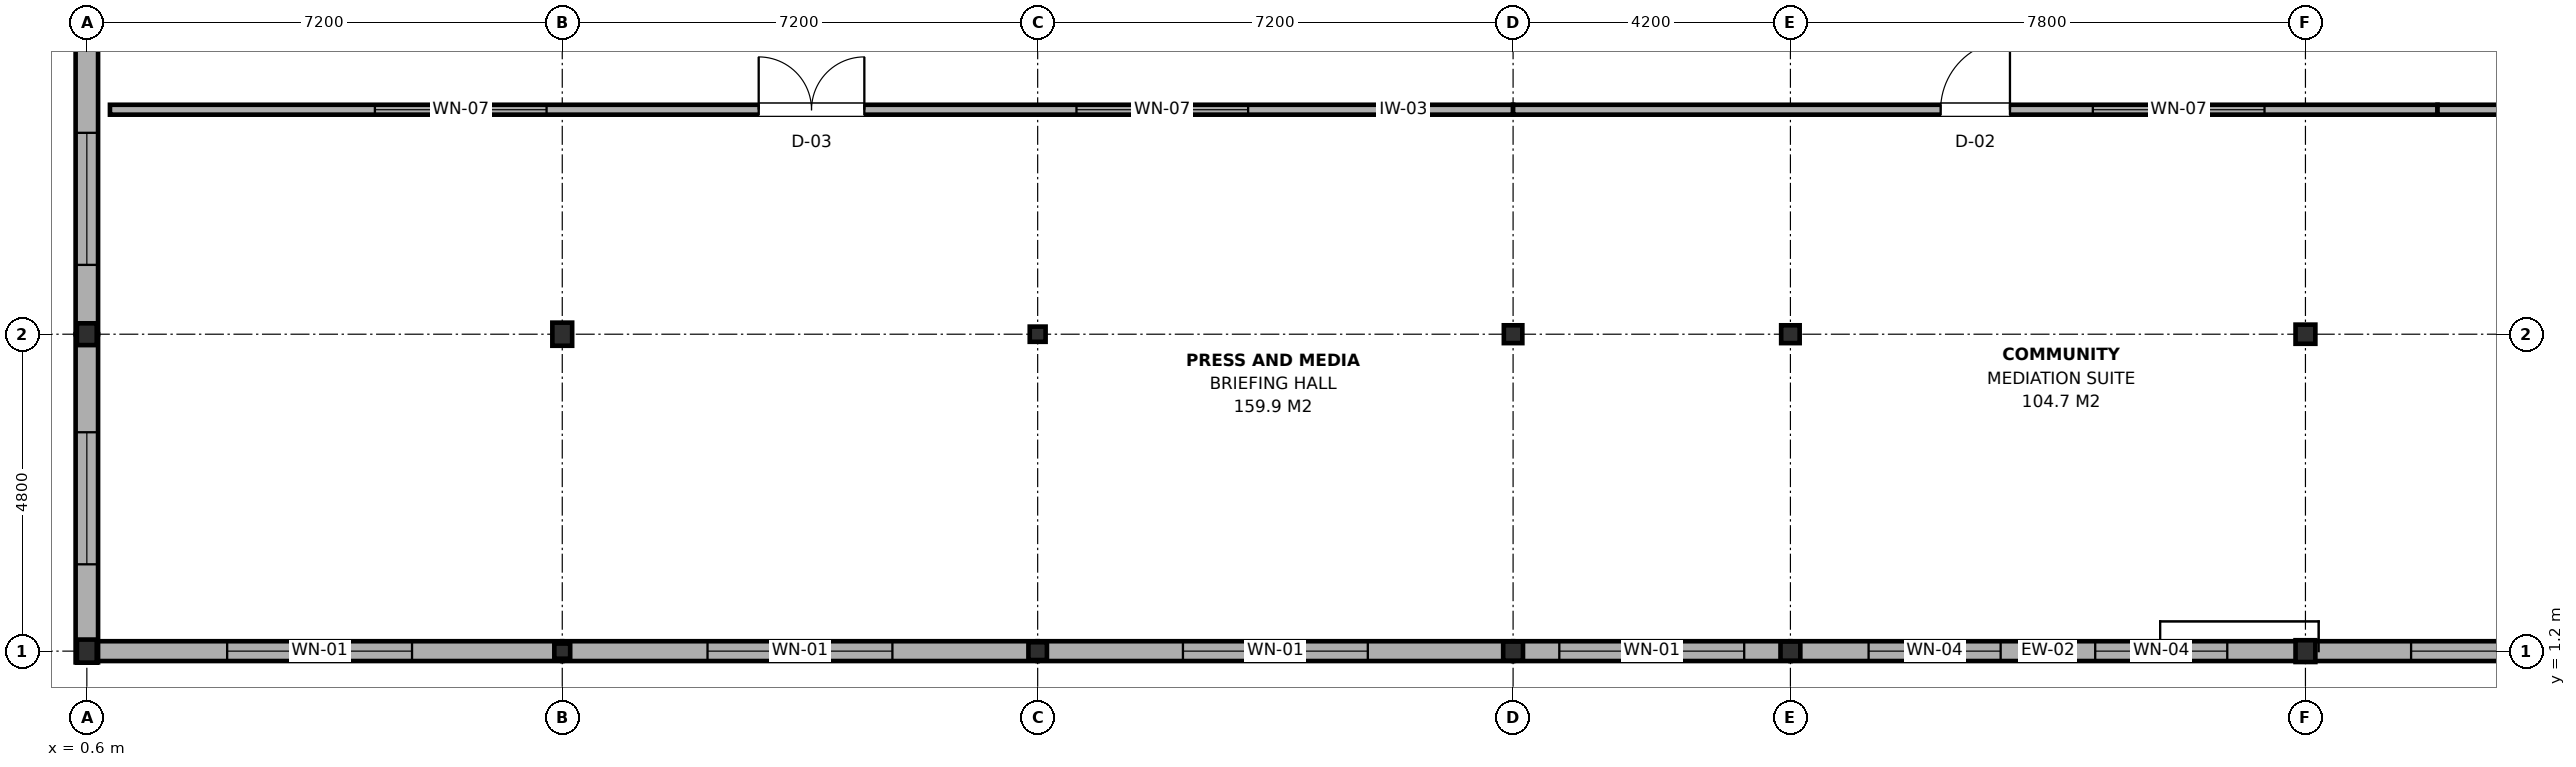
"""IFC4 building model, lengths in metres.
Left out: names, types, materials, properties, quantities, classifications, styles, units other than length and angle.
Written with IfcOpenShell. Run it as: python <this file> out.ifc"""

import sys

from ifc_helpers import new_model, si_unit, direction, frame, frame_2d, origin, origin_2d, place, context, subcontext, project, spatial, rectangle, i_section, extrude, element, fill, save


model = new_model("IFC4")
c1 = context("Model", 3, precision=1e-05, world=origin(), true_north=direction((0.0, 1.0)))
c2 = subcontext(c1, "Body", "Model", "MODEL_VIEW")
j1 = project(units=[si_unit("LENGTHUNIT", "METRE"), si_unit("PLANEANGLEUNIT", "RADIAN")], contexts=[c1])
p1 = place(None, origin())
s1 = spatial("IfcSite", under=j1, at=p1, CompositionType="ELEMENT")
p2 = place(p1, origin())
s2 = spatial("IfcBuilding", under=s1, at=p2, CompositionType="ELEMENT")
p3 = place(p2, frame((0.0, 0.0, 4.8)))
s3 = spatial("IfcBuildingStorey", under=s2, at=p3, CompositionType="ELEMENT", Elevation=4.8)
p4 = place(p3, frame((0.6, 1.2, 0.0), z_axis=(0.0, 0.0, 1.0), x_axis=(1.0, 0.0, 0.0)))
e1 = element("IfcColumn", 1, at=p4, inside=s3, PredefinedType="COLUMN", context=c2, shape_type="SweptSolid", body=[
    extrude(i_section(OverallWidth=0.3, OverallDepth=0.35, WebThickness=0.01, FlangeThickness=0.018, FilletRadius=0.027, at=origin_2d()), origin(), (0.0, 0.0, 1.0), 3.98),
])
p5 = place(p3, frame((0.6, 6.0, 0.0), z_axis=(0.0, 0.0, 1.0), x_axis=(1.0, 0.0, 0.0)))
e2 = element("IfcColumn", 2, at=p5, inside=s3, PredefinedType="COLUMN", context=c2, shape_type="SweptSolid", body=[
    extrude(i_section(OverallWidth=0.3, OverallDepth=0.33, WebThickness=0.01, FlangeThickness=0.017, FilletRadius=0.027, at=origin_2d()), origin(), (0.0, 0.0, 1.0), 3.98),
])
p6 = place(p3, frame((7.8, 1.2, 0.0), z_axis=(0.0, 0.0, 1.0), x_axis=(1.0, 0.0, 0.0)))
e3 = element("IfcColumn", 3, at=p6, inside=s3, PredefinedType="COLUMN", context=c2, shape_type="SweptSolid", body=[
    extrude(i_section(OverallWidth=0.24, OverallDepth=0.23, WebThickness=0.008, FlangeThickness=0.012, FilletRadius=0.021, at=origin_2d()), origin(), (0.0, 0.0, 1.0), 3.98),
])
p7 = place(p3, frame((7.8, 6.0, 0.0), z_axis=(0.0, 0.0, 1.0), x_axis=(1.0, 0.0, 0.0)))
e4 = element("IfcColumn", 4, at=p7, inside=s3, PredefinedType="COLUMN", context=c2, shape_type="SweptSolid", body=[
    extrude(i_section(OverallWidth=0.3, OverallDepth=0.35, WebThickness=0.01, FlangeThickness=0.018, FilletRadius=0.027, at=origin_2d()), origin(), (0.0, 0.0, 1.0), 3.98),
])
p8 = place(p3, frame((15.0, 1.2, 0.0), z_axis=(0.0, 0.0, 1.0), x_axis=(1.0, 0.0, 0.0)))
e5 = element("IfcColumn", 5, at=p8, inside=s3, PredefinedType="COLUMN", context=c2, shape_type="SweptSolid", body=[
    extrude(i_section(OverallWidth=0.28, OverallDepth=0.27, WebThickness=0.008, FlangeThickness=0.013, FilletRadius=0.024, at=origin_2d()), origin(), (0.0, 0.0, 1.0), 3.98),
])
p9 = place(p3, frame((15.0, 6.0, 0.0), z_axis=(0.0, 0.0, 1.0), x_axis=(1.0, 0.0, 0.0)))
e6 = element("IfcColumn", 6, at=p9, inside=s3, PredefinedType="COLUMN", context=c2, shape_type="SweptSolid", body=[
    extrude(i_section(OverallWidth=0.24, OverallDepth=0.23, WebThickness=0.008, FlangeThickness=0.012, FilletRadius=0.021, at=origin_2d()), origin(), (0.0, 0.0, 1.0), 3.98),
])
p10 = place(p3, frame((22.2, 1.2, 0.0), z_axis=(0.0, 0.0, 1.0), x_axis=(1.0, 0.0, 0.0)))
e7 = element("IfcColumn", 7, at=p10, inside=s3, PredefinedType="COLUMN", context=c2, shape_type="SweptSolid", body=[
    extrude(i_section(OverallWidth=0.3, OverallDepth=0.29, WebThickness=0.009, FlangeThickness=0.014, FilletRadius=0.027, at=origin_2d()), origin(), (0.0, 0.0, 1.0), 3.98),
])
p11 = place(p3, frame((22.2, 6.0, 0.0), z_axis=(0.0, 0.0, 1.0), x_axis=(1.0, 0.0, 0.0)))
e8 = element("IfcColumn", 8, at=p11, inside=s3, PredefinedType="COLUMN", context=c2, shape_type="SweptSolid", body=[
    extrude(i_section(OverallWidth=0.28, OverallDepth=0.27, WebThickness=0.008, FlangeThickness=0.013, FilletRadius=0.024, at=origin_2d()), origin(), (0.0, 0.0, 1.0), 3.98),
])
p12 = place(p3, frame((26.4, 1.2, 0.0), z_axis=(0.0, 0.0, 1.0), x_axis=(1.0, 0.0, 0.0)))
e9 = element("IfcColumn", 9, at=p12, inside=s3, PredefinedType="COLUMN", context=c2, shape_type="SweptSolid", body=[
    extrude(i_section(OverallWidth=0.3, OverallDepth=0.29, WebThickness=0.009, FlangeThickness=0.014, FilletRadius=0.027, at=origin_2d()), origin(), (0.0, 0.0, 1.0), 3.98),
])
p13 = place(p3, frame((26.4, 6.0, 0.0), z_axis=(0.0, 0.0, 1.0), x_axis=(1.0, 0.0, 0.0)))
e10 = element("IfcColumn", 10, at=p13, inside=s3, PredefinedType="COLUMN", context=c2, shape_type="SweptSolid", body=[
    extrude(i_section(OverallWidth=0.28, OverallDepth=0.27, WebThickness=0.008, FlangeThickness=0.013, FilletRadius=0.024, at=origin_2d()), origin(), (0.0, 0.0, 1.0), 3.98),
])
p14 = place(p3, frame((34.2, 1.2, 0.0), z_axis=(0.0, 0.0, 1.0), x_axis=(1.0, 0.0, 0.0)))
e11 = element("IfcColumn", 11, at=p14, inside=s3, PredefinedType="COLUMN", context=c2, shape_type="SweptSolid", body=[
    extrude(i_section(OverallWidth=0.3, OverallDepth=0.33, WebThickness=0.01, FlangeThickness=0.017, FilletRadius=0.027, at=origin_2d()), origin(), (0.0, 0.0, 1.0), 3.98),
])
p15 = place(p3, frame((34.2, 6.0, 0.0), z_axis=(0.0, 0.0, 1.0), x_axis=(1.0, 0.0, 0.0)))
e12 = element("IfcColumn", 12, at=p15, inside=s3, PredefinedType="COLUMN", context=c2, shape_type="SweptSolid", body=[
    extrude(i_section(OverallWidth=0.3, OverallDepth=0.29, WebThickness=0.009, FlangeThickness=0.014, FilletRadius=0.027, at=origin_2d()), origin(), (0.0, 0.0, 1.0), 3.98),
])
p16 = place(p3, frame((0.45, 1.2, 0.0), z_axis=(0.0, 0.0, 1.0), x_axis=(1.0, 0.0, 0.0)))
e13 = element("IfcWall", 13, at=p16, inside=s3, PredefinedType="SOLIDWALL", context=c2, shape_type="SweptSolid", body=[
    extrude(rectangle(XDim=7.35, YDim=0.3, at=frame_2d((3.675, 0.0))), origin(), (0.0, 0.0, 1.0), 3.475),
])
p17 = place(p16, frame((2.275, 0.0, 0.9)))
e14 = element("IfcOpeningElement", 14, at=p17, cuts=e13, PredefinedType="OPENING", context=c2, shape_type="SweptSolid", body=[
    extrude(rectangle(XDim=2.8, YDim=2.2, at=frame_2d((1.4, 1.1))), frame((0.0, 0.165, 0.0), z_axis=(0.0, -1.0, 0.0), x_axis=(1.0, 0.0, 0.0)), (0.0, 0.0, 1.0), 0.33),
])
p18 = place(p3, frame((7.8, 1.2, 0.0), z_axis=(0.0, 0.0, 1.0), x_axis=(1.0, 0.0, 0.0)))
e15 = element("IfcWall", 15, at=p18, inside=s3, PredefinedType="SOLIDWALL", context=c2, shape_type="SweptSolid", body=[
    extrude(rectangle(XDim=7.2, YDim=0.3, at=frame_2d((3.6, 0.0))), origin(), (0.0, 0.0, 1.0), 3.475),
])
p19 = place(p18, frame((2.2, 0.0, 0.9)))
e16 = element("IfcOpeningElement", 16, at=p19, cuts=e15, PredefinedType="OPENING", context=c2, shape_type="SweptSolid", body=[
    extrude(rectangle(XDim=2.8, YDim=2.2, at=frame_2d((1.4, 1.1))), frame((0.0, 0.165, 0.0), z_axis=(0.0, -1.0, 0.0), x_axis=(1.0, 0.0, 0.0)), (0.0, 0.0, 1.0), 0.33),
])
p20 = place(p3, frame((15.0, 1.2, 0.0), z_axis=(0.0, 0.0, 1.0), x_axis=(1.0, 0.0, 0.0)))
e17 = element("IfcWall", 17, at=p20, inside=s3, PredefinedType="SOLIDWALL", context=c2, shape_type="SweptSolid", body=[
    extrude(rectangle(XDim=7.2, YDim=0.3, at=frame_2d((3.6, 0.0))), origin(), (0.0, 0.0, 1.0), 3.525),
])
p21 = place(p20, frame((2.2, 0.0, 0.9)))
e18 = element("IfcOpeningElement", 18, at=p21, cuts=e17, PredefinedType="OPENING", context=c2, shape_type="SweptSolid", body=[
    extrude(rectangle(XDim=2.8, YDim=2.2, at=frame_2d((1.4, 1.1))), frame((0.0, 0.165, 0.0), z_axis=(0.0, -1.0, 0.0), x_axis=(1.0, 0.0, 0.0)), (0.0, 0.0, 1.0), 0.33),
])
p22 = place(p3, frame((22.2, 1.2, 0.0), z_axis=(0.0, 0.0, 1.0), x_axis=(1.0, 0.0, 0.0)))
e19 = element("IfcWall", 19, at=p22, inside=s3, PredefinedType="SOLIDWALL", context=c2, shape_type="SweptSolid", body=[
    extrude(rectangle(XDim=4.2, YDim=0.3, at=frame_2d((2.1, 0.0))), origin(), (0.0, 0.0, 1.0), 3.375),
])
p23 = place(p22, frame((0.7, 0.0, 0.9)))
e20 = element("IfcOpeningElement", 20, at=p23, cuts=e19, PredefinedType="OPENING", context=c2, shape_type="SweptSolid", body=[
    extrude(rectangle(XDim=2.8, YDim=2.2, at=frame_2d((1.4, 1.1))), frame((0.0, 0.165, 0.0), z_axis=(0.0, -1.0, 0.0), x_axis=(1.0, 0.0, 0.0)), (0.0, 0.0, 1.0), 0.33),
])
p24 = place(p3, frame((26.4, 1.2, 0.0), z_axis=(0.0, 0.0, 1.0), x_axis=(1.0, 0.0, 0.0)))
e21 = element("IfcWall", 21, at=p24, inside=s3, PredefinedType="SOLIDWALL", context=c2, shape_type="SweptSolid", body=[
    extrude(rectangle(XDim=7.8, YDim=0.3, at=frame_2d((3.9, 0.0))), origin(), (0.0, 0.0, 1.0), 3.375),
])
p25 = place(p24, frame((1.184, 0.0, 0.9)))
e22 = element("IfcOpeningElement", 22, at=p25, cuts=e21, PredefinedType="OPENING", context=c2, shape_type="SweptSolid", body=[
    extrude(rectangle(XDim=2.0, YDim=1.8, at=frame_2d((1.0, 0.9))), frame((0.0, 0.165, 0.0), z_axis=(0.0, -1.0, 0.0), x_axis=(1.0, 0.0, 0.0)), (0.0, 0.0, 1.0), 0.33),
])
p26 = place(p24, frame((4.616, 0.0, 0.9)))
e23 = element("IfcOpeningElement", 23, at=p26, cuts=e21, PredefinedType="OPENING", context=c2, shape_type="SweptSolid", body=[
    extrude(rectangle(XDim=2.0, YDim=1.8, at=frame_2d((1.0, 0.9))), frame((0.0, 0.165, 0.0), z_axis=(0.0, -1.0, 0.0), x_axis=(1.0, 0.0, 0.0)), (0.0, 0.0, 1.0), 0.33),
])
p27 = place(p3, frame((34.2, 1.2, 0.0), z_axis=(0.0, 0.0, 1.0), x_axis=(1.0, 0.0, 0.0)))
e24 = element("IfcWall", 24, at=p27, inside=s3, PredefinedType="SOLIDWALL", context=c2, shape_type="SweptSolid", body=[
    extrude(rectangle(XDim=6.0, YDim=0.3, at=frame_2d((3.0, 0.0))), origin(), (0.0, 0.0, 1.0), 3.375),
])
p28 = place(p27, frame((1.6, 0.0, 0.9)))
e25 = element("IfcOpeningElement", 25, at=p28, cuts=e24, PredefinedType="OPENING", context=c2, shape_type="SweptSolid", body=[
    extrude(rectangle(XDim=2.8, YDim=2.2, at=frame_2d((1.4, 1.1))), frame((0.0, 0.165, 0.0), z_axis=(0.0, -1.0, 0.0), x_axis=(1.0, 0.0, 0.0)), (0.0, 0.0, 1.0), 0.33),
])
p29 = place(p3, frame((0.6, 1.03, 0.0), z_axis=(0.0, 0.0, 1.0), x_axis=(0.0, 1.0, 0.0)))
e26 = element("IfcWall", 26, at=p29, inside=s3, PredefinedType="SOLIDWALL", context=c2, shape_type="SweptSolid", body=[
    extrude(rectangle(XDim=4.97, YDim=0.34, at=frame_2d((2.485, 0.0))), origin(), (0.0, 0.0, 1.0), 3.475),
])
p30 = place(p29, frame((1.485, 0.0, 0.9)))
e27 = element("IfcOpeningElement", 27, at=p30, cuts=e26, PredefinedType="OPENING", context=c2, shape_type="SweptSolid", body=[
    extrude(rectangle(XDim=2.0, YDim=1.8, at=frame_2d((1.0, 0.9))), frame((0.0, 0.185, 0.0), z_axis=(0.0, -1.0, 0.0), x_axis=(1.0, 0.0, 0.0)), (0.0, 0.0, 1.0), 0.37),
])
p31 = place(p3, frame((0.6, 6.0, 0.0), z_axis=(0.0, 0.0, 1.0), x_axis=(0.0, 1.0, 0.0)))
e28 = element("IfcWall", 28, at=p31, inside=s3, PredefinedType="SOLIDWALL", context=c2, shape_type="SweptSolid", body=[
    extrude(rectangle(XDim=6.0, YDim=0.34, at=frame_2d((3.0, 0.0))), origin(), (0.0, 0.0, 1.0), 3.475),
])
p32 = place(p31, frame((1.05, 0.0, 0.9)))
e29 = element("IfcOpeningElement", 29, at=p32, cuts=e28, PredefinedType="OPENING", context=c2, shape_type="SweptSolid", body=[
    extrude(rectangle(XDim=2.0, YDim=1.8, at=frame_2d((1.0, 0.9))), frame((0.0, 0.185, 0.0), z_axis=(0.0, -1.0, 0.0), x_axis=(1.0, 0.0, 0.0)), (0.0, 0.0, 1.0), 0.37),
])
p33 = place(p3, frame((0.95, 9.4, 0.0), z_axis=(0.0, 0.0, 1.0), x_axis=(1.0, 0.0, 0.0)))
e30 = element("IfcWall", 30, at=p33, inside=s3, PredefinedType="PARTITIONING", context=c2, shape_type="SweptSolid", body=[
    extrude(rectangle(XDim=21.25, YDim=0.15, at=frame_2d((10.625, 0.0))), origin(), (0.0, 0.0, 1.0), 3.475),
])
p34 = place(p33, frame((9.825, 0.0, 0.0)))
e31 = element("IfcOpeningElement", 31, at=p34, cuts=e30, PredefinedType="OPENING", context=c2, shape_type="SweptSolid", body=[
    extrude(rectangle(XDim=1.6, YDim=2.15, at=frame_2d((0.8, 1.075))), frame((0.0, 0.09, 0.0), z_axis=(0.0, -1.0, 0.0), x_axis=(1.0, 0.0, 0.0)), (0.0, 0.0, 1.0), 0.18),
])
p35 = place(p33, frame((4.012, 0.0, 0.95)))
e32 = element("IfcOpeningElement", 32, at=p35, cuts=e30, PredefinedType="OPENING", context=c2, shape_type="SweptSolid", body=[
    extrude(rectangle(XDim=2.6, YDim=1.5, at=frame_2d((1.3, 0.75))), frame((0.0, 0.09, 0.0), z_axis=(0.0, -1.0, 0.0), x_axis=(1.0, 0.0, 0.0)), (0.0, 0.0, 1.0), 0.18),
])
p36 = place(p33, frame((14.637, 0.0, 0.95)))
e33 = element("IfcOpeningElement", 33, at=p36, cuts=e30, PredefinedType="OPENING", context=c2, shape_type="SweptSolid", body=[
    extrude(rectangle(XDim=2.6, YDim=1.5, at=frame_2d((1.3, 0.75))), frame((0.0, 0.09, 0.0), z_axis=(0.0, -1.0, 0.0), x_axis=(1.0, 0.0, 0.0)), (0.0, 0.0, 1.0), 0.18),
])
p37 = place(p3, frame((22.2, 9.4, 0.0), z_axis=(0.0, 0.0, 1.0), x_axis=(1.0, 0.0, 0.0)))
e34 = element("IfcWall", 34, at=p37, inside=s3, PredefinedType="PARTITIONING", context=c2, shape_type="SweptSolid", body=[
    extrude(rectangle(XDim=14.0, YDim=0.15, at=frame_2d((7.0, 0.0))), origin(), (0.0, 0.0, 1.0), 3.335),
])
p38 = place(p37, frame((6.475, 0.0, 0.0)))
e35 = element("IfcOpeningElement", 35, at=p38, cuts=e34, PredefinedType="OPENING", context=c2, shape_type="SweptSolid", body=[
    extrude(rectangle(XDim=1.05, YDim=2.15, at=frame_2d((0.525, 1.075))), frame((0.0, 0.09, 0.0), z_axis=(0.0, -1.0, 0.0), x_axis=(1.0, 0.0, 0.0)), (0.0, 0.0, 1.0), 0.18),
])
p39 = place(p37, frame((8.78, 0.0, 0.95)))
e36 = element("IfcOpeningElement", 36, at=p39, cuts=e34, PredefinedType="OPENING", context=c2, shape_type="SweptSolid", body=[
    extrude(rectangle(XDim=2.6, YDim=1.5, at=frame_2d((1.3, 0.75))), frame((0.0, 0.09, 0.0), z_axis=(0.0, -1.0, 0.0), x_axis=(1.0, 0.0, 0.0)), (0.0, 0.0, 1.0), 0.18),
])
p40 = place(p3, frame((36.2, 9.4, 0.0), z_axis=(0.0, 0.0, 1.0), x_axis=(1.0, 0.0, 0.0)))
e37 = element("IfcWall", 37, at=p40, inside=s3, PredefinedType="PARTITIONING", context=c2, shape_type="SweptSolid", body=[
    extrude(rectangle(XDim=10.8, YDim=0.15, at=frame_2d((5.4, 0.0))), origin(), (0.0, 0.0, 1.0), 3.285),
])
p41 = place(p40, frame((4.875, 0.0, 0.0)))
e38 = element("IfcOpeningElement", 38, at=p41, cuts=e37, PredefinedType="OPENING", context=c2, shape_type="SweptSolid", body=[
    extrude(rectangle(XDim=1.05, YDim=2.15, at=frame_2d((0.525, 1.075))), frame((0.0, 0.09, 0.0), z_axis=(0.0, -1.0, 0.0), x_axis=(1.0, 0.0, 0.0)), (0.0, 0.0, 1.0), 0.18),
])
p42 = place(p40, frame((6.476, 0.0, 0.95)))
e39 = element("IfcOpeningElement", 39, at=p42, cuts=e37, PredefinedType="OPENING", context=c2, shape_type="SweptSolid", body=[
    extrude(rectangle(XDim=2.6, YDim=1.5, at=frame_2d((1.3, 0.75))), frame((0.0, 0.09, 0.0), z_axis=(0.0, -1.0, 0.0), x_axis=(1.0, 0.0, 0.0)), (0.0, 0.0, 1.0), 0.18),
])
p43 = place(p17, origin())
e40 = element("IfcWindow", 40, at=p43, inside=s3, PartitioningType="SINGLE_PANEL", PredefinedType="WINDOW", context=c2, shape_type="SweptSolid", body=[
    extrude(rectangle(XDim=2.8, YDim=2.2, at=frame_2d((1.4, 1.1))), frame((0.0, 0.03, 0.0), z_axis=(0.0, -1.0, 0.0), x_axis=(1.0, 0.0, 0.0)), (0.0, 0.0, 1.0), 0.06),
])
fill(e14, e40)
p44 = place(p19, origin())
e41 = element("IfcWindow", 41, at=p44, inside=s3, PartitioningType="SINGLE_PANEL", PredefinedType="WINDOW", context=c2, shape_type="SweptSolid", body=[
    extrude(rectangle(XDim=2.8, YDim=2.2, at=frame_2d((1.4, 1.1))), frame((0.0, 0.03, 0.0), z_axis=(0.0, -1.0, 0.0), x_axis=(1.0, 0.0, 0.0)), (0.0, 0.0, 1.0), 0.06),
])
fill(e16, e41)
p45 = place(p21, origin())
e42 = element("IfcWindow", 42, at=p45, inside=s3, PartitioningType="SINGLE_PANEL", PredefinedType="WINDOW", context=c2, shape_type="SweptSolid", body=[
    extrude(rectangle(XDim=2.8, YDim=2.2, at=frame_2d((1.4, 1.1))), frame((0.0, 0.03, 0.0), z_axis=(0.0, -1.0, 0.0), x_axis=(1.0, 0.0, 0.0)), (0.0, 0.0, 1.0), 0.06),
])
fill(e18, e42)
p46 = place(p23, origin())
e43 = element("IfcWindow", 43, at=p46, inside=s3, PartitioningType="SINGLE_PANEL", PredefinedType="WINDOW", context=c2, shape_type="SweptSolid", body=[
    extrude(rectangle(XDim=2.8, YDim=2.2, at=frame_2d((1.4, 1.1))), frame((0.0, 0.03, 0.0), z_axis=(0.0, -1.0, 0.0), x_axis=(1.0, 0.0, 0.0)), (0.0, 0.0, 1.0), 0.06),
])
fill(e20, e43)
p47 = place(p25, origin())
e44 = element("IfcWindow", 44, at=p47, inside=s3, PartitioningType="SINGLE_PANEL", PredefinedType="WINDOW", context=c2, shape_type="SweptSolid", body=[
    extrude(rectangle(XDim=2.0, YDim=1.8, at=frame_2d((1.0, 0.9))), frame((0.0, 0.03, 0.0), z_axis=(0.0, -1.0, 0.0), x_axis=(1.0, 0.0, 0.0)), (0.0, 0.0, 1.0), 0.06),
])
fill(e22, e44)
p48 = place(p26, origin())
e45 = element("IfcWindow", 45, at=p48, inside=s3, PartitioningType="SINGLE_PANEL", PredefinedType="WINDOW", context=c2, shape_type="SweptSolid", body=[
    extrude(rectangle(XDim=2.0, YDim=1.8, at=frame_2d((1.0, 0.9))), frame((0.0, 0.03, 0.0), z_axis=(0.0, -1.0, 0.0), x_axis=(1.0, 0.0, 0.0)), (0.0, 0.0, 1.0), 0.06),
])
fill(e23, e45)
p49 = place(p28, origin())
e46 = element("IfcWindow", 46, at=p49, inside=s3, PartitioningType="SINGLE_PANEL", PredefinedType="WINDOW", context=c2, shape_type="SweptSolid", body=[
    extrude(rectangle(XDim=2.8, YDim=2.2, at=frame_2d((1.4, 1.1))), frame((0.0, 0.03, 0.0), z_axis=(0.0, -1.0, 0.0), x_axis=(1.0, 0.0, 0.0)), (0.0, 0.0, 1.0), 0.06),
])
fill(e25, e46)
p50 = place(p30, origin())
e47 = element("IfcWindow", 47, at=p50, inside=s3, PartitioningType="SINGLE_PANEL", PredefinedType="WINDOW", context=c2, shape_type="SweptSolid", body=[
    extrude(rectangle(XDim=2.0, YDim=1.8, at=frame_2d((1.0, 0.9))), frame((0.0, 0.03, 0.0), z_axis=(0.0, -1.0, 0.0), x_axis=(1.0, 0.0, 0.0)), (0.0, 0.0, 1.0), 0.06),
])
fill(e27, e47)
p51 = place(p32, origin())
e48 = element("IfcWindow", 48, at=p51, inside=s3, PartitioningType="SINGLE_PANEL", PredefinedType="WINDOW", context=c2, shape_type="SweptSolid", body=[
    extrude(rectangle(XDim=2.0, YDim=1.8, at=frame_2d((1.0, 0.9))), frame((0.0, 0.03, 0.0), z_axis=(0.0, -1.0, 0.0), x_axis=(1.0, 0.0, 0.0)), (0.0, 0.0, 1.0), 0.06),
])
fill(e29, e48)
p52 = place(p34, origin())
e49 = element("IfcDoor", 49, at=p52, inside=s3, OperationType="DOUBLE_DOOR_SINGLE_SWING", PredefinedType="DOOR", context=c2, shape_type="SweptSolid", body=[
    extrude(rectangle(XDim=1.6, YDim=2.15, at=frame_2d((0.8, 1.075))), frame((0.0, 0.025, 0.0), z_axis=(0.0, -1.0, 0.0), x_axis=(1.0, 0.0, 0.0)), (0.0, 0.0, 1.0), 0.05),
])
fill(e31, e49)
p53 = place(p35, origin())
e50 = element("IfcWindow", 50, at=p53, inside=s3, PartitioningType="SINGLE_PANEL", PredefinedType="WINDOW", context=c2, shape_type="SweptSolid", body=[
    extrude(rectangle(XDim=2.6, YDim=1.5, at=frame_2d((1.3, 0.75))), frame((0.0, 0.03, 0.0), z_axis=(0.0, -1.0, 0.0), x_axis=(1.0, 0.0, 0.0)), (0.0, 0.0, 1.0), 0.06),
])
fill(e32, e50)
p54 = place(p36, origin())
e51 = element("IfcWindow", 51, at=p54, inside=s3, PartitioningType="SINGLE_PANEL", PredefinedType="WINDOW", context=c2, shape_type="SweptSolid", body=[
    extrude(rectangle(XDim=2.6, YDim=1.5, at=frame_2d((1.3, 0.75))), frame((0.0, 0.03, 0.0), z_axis=(0.0, -1.0, 0.0), x_axis=(1.0, 0.0, 0.0)), (0.0, 0.0, 1.0), 0.06),
])
fill(e33, e51)
p55 = place(p38, origin())
e52 = element("IfcDoor", 52, at=p55, inside=s3, OperationType="SINGLE_SWING_RIGHT", PredefinedType="DOOR", context=c2, shape_type="SweptSolid", body=[
    extrude(rectangle(XDim=1.05, YDim=2.15, at=frame_2d((0.525, 1.075))), frame((0.0, 0.025, 0.0), z_axis=(0.0, -1.0, 0.0), x_axis=(1.0, 0.0, 0.0)), (0.0, 0.0, 1.0), 0.05),
])
fill(e35, e52)
p56 = place(p39, origin())
e53 = element("IfcWindow", 53, at=p56, inside=s3, PartitioningType="SINGLE_PANEL", PredefinedType="WINDOW", context=c2, shape_type="SweptSolid", body=[
    extrude(rectangle(XDim=2.6, YDim=1.5, at=frame_2d((1.3, 0.75))), frame((0.0, 0.03, 0.0), z_axis=(0.0, -1.0, 0.0), x_axis=(1.0, 0.0, 0.0)), (0.0, 0.0, 1.0), 0.06),
])
fill(e36, e53)
save(model, sys.argv[1])
